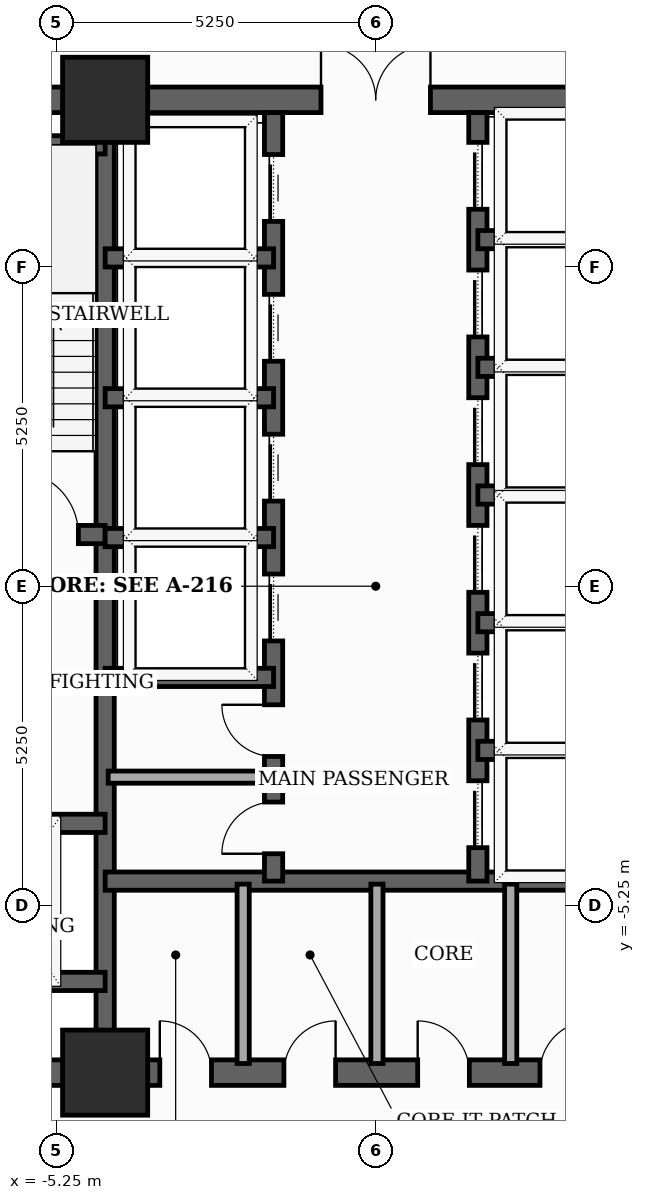
"""IFC4 building model, lengths in metres.
Left out: names, types, materials, properties, quantities, classifications, styles, units other than length and angle.
Written with IfcOpenShell. Run it as: python <this file> out.ifc"""

import sys

from ifc_helpers import new_model, si_unit, direction, frame, frame_2d, origin, origin_2d, place, context, subcontext, project, spatial, rectangle, extrude, element, fill, save


model = new_model("IFC4")
c1 = context("Model", 3, precision=1e-05, world=origin(), true_north=direction((0.0, 1.0)))
c2 = subcontext(c1, "Body", "Model", "MODEL_VIEW")
j1 = project(units=[si_unit("LENGTHUNIT", "METRE"), si_unit("PLANEANGLEUNIT", "RADIAN")], contexts=[c1])
p1 = place(None, origin())
s1 = spatial("IfcSite", under=j1, at=p1, CompositionType="ELEMENT")
p2 = place(p1, origin())
s2 = spatial("IfcBuilding", under=s1, at=p2, CompositionType="ELEMENT")
p3 = place(p2, frame((0.0, 0.0, 112.5)))
s3 = spatial("IfcBuildingStorey", under=s2, at=p3, CompositionType="ELEMENT", Elevation=112.5)
for number, where, z_axis, x_axis in (
    (1, (-4.45, -8.0, 0.0), (0.0, 0.0, 1.0), (1.0, 0.0, 0.0)),
    (2, (-4.45, 8.0, 0.0), (0.0, 0.0, 1.0), (1.0, 0.0, 0.0)),
):
    element("IfcColumn", number, at=place(p3, frame(where, z_axis=z_axis, x_axis=x_axis)), inside=s3, PredefinedType="COLUMN", context=c2, shape_type="SweptSolid", body=[
        extrude(rectangle(XDim=1.4, YDim=1.4, at=origin_2d()), origin(), (0.0, 0.0, 1.0), 3.7),
    ])
p4 = place(p3, frame((-8.0, -8.0, 0.0), z_axis=(0.0, 0.0, 1.0), x_axis=(1.0, 0.0, 0.0)))
e3 = element("IfcWall", 3, at=p4, inside=s3, PredefinedType="SHEAR", context=c2, shape_type="SweptSolid", body=[
    extrude(rectangle(XDim=16.0, YDim=0.42, at=frame_2d((8.0, 0.0))), origin(), (0.0, 0.0, 1.0), 3.5),
])
p5 = place(p4, frame((4.449, 0.0, 0.0)))
e4 = element("IfcOpeningElement", 4, at=p5, cuts=e3, PredefinedType="OPENING", context=c2, shape_type="SweptSolid", body=[
    extrude(rectangle(XDim=0.85, YDim=2.02, at=frame_2d((0.425, 1.01))), frame((0.0, 0.22, 0.0), z_axis=(0.0, -1.0, 0.0), x_axis=(1.0, 0.0, 0.0)), (0.0, 0.0, 1.0), 0.44),
])
p6 = place(p4, frame((6.49, 0.0, 0.0)))
e5 = element("IfcOpeningElement", 5, at=p6, cuts=e3, PredefinedType="OPENING", context=c2, shape_type="SweptSolid", body=[
    extrude(rectangle(XDim=0.85, YDim=2.02, at=frame_2d((0.425, 1.01))), frame((0.0, 0.22, 0.0), z_axis=(0.0, -1.0, 0.0), x_axis=(1.0, 0.0, 0.0)), (0.0, 0.0, 1.0), 0.44),
])
p7 = place(p4, frame((8.69, 0.0, 0.0)))
e6 = element("IfcOpeningElement", 6, at=p7, cuts=e3, PredefinedType="OPENING", context=c2, shape_type="SweptSolid", body=[
    extrude(rectangle(XDim=0.85, YDim=2.02, at=frame_2d((0.425, 1.01))), frame((0.0, 0.22, 0.0), z_axis=(0.0, -1.0, 0.0), x_axis=(1.0, 0.0, 0.0)), (0.0, 0.0, 1.0), 0.44),
])
p8 = place(p4, frame((10.701, 0.0, 0.0)))
e7 = element("IfcOpeningElement", 7, at=p8, cuts=e3, PredefinedType="OPENING", context=c2, shape_type="SweptSolid", body=[
    extrude(rectangle(XDim=0.85, YDim=2.02, at=frame_2d((0.425, 1.01))), frame((0.0, 0.22, 0.0), z_axis=(0.0, -1.0, 0.0), x_axis=(1.0, 0.0, 0.0)), (0.0, 0.0, 1.0), 0.44),
])
p9 = place(p3, frame((-8.0, 8.0, 0.0), z_axis=(0.0, 0.0, 1.0), x_axis=(1.0, 0.0, 0.0)))
e8 = element("IfcWall", 8, at=p9, inside=s3, PredefinedType="SHEAR", context=c2, shape_type="SweptSolid", body=[
    extrude(rectangle(XDim=16.0, YDim=0.42, at=frame_2d((8.0, 0.0))), origin(), (0.0, 0.0, 1.0), 3.5),
])
p10 = place(p9, frame((7.1, 0.0, 0.0)))
e9 = element("IfcOpeningElement", 9, at=p10, cuts=e8, PredefinedType="OPENING", context=c2, shape_type="SweptSolid", body=[
    extrude(rectangle(XDim=1.8, YDim=2.15, at=frame_2d((0.9, 1.075))), frame((0.0, 0.22, 0.0), z_axis=(0.0, -1.0, 0.0), x_axis=(1.0, 0.0, 0.0)), (0.0, 0.0, 1.0), 0.44),
])
p11 = place(p3, frame((-4.45, -7.79, 0.0), z_axis=(0.0, 0.0, 1.0), x_axis=(0.0, 1.0, 0.0)))
e10 = element("IfcWall", 10, at=p11, inside=s3, PredefinedType="SHEAR", context=c2, shape_type="SweptSolid", body=[
    extrude(rectangle(XDim=15.58, YDim=0.3, at=frame_2d((7.79, 0.0))), origin(), (0.0, 0.0, 1.0), 3.5),
])
p12 = place(p3, frame((-7.79, 0.85, 0.0), z_axis=(0.0, 0.0, 1.0), x_axis=(1.0, 0.0, 0.0)))
e11 = element("IfcWall", 11, at=p12, inside=s3, PredefinedType="SHEAR", context=c2, shape_type="SweptSolid", body=[
    extrude(rectangle(XDim=3.34, YDim=0.3, at=frame_2d((1.67, 0.0))), origin(), (0.0, 0.0, 1.0), 3.5),
])
p13 = place(p12, frame((1.85, 0.0, 0.0)))
e12 = element("IfcOpeningElement", 12, at=p13, cuts=e11, PredefinedType="OPENING", context=c2, shape_type="SweptSolid", body=[
    extrude(rectangle(XDim=1.05, YDim=2.15, at=frame_2d((0.525, 1.075))), frame((0.0, 0.16, 0.0), z_axis=(0.0, -1.0, 0.0), x_axis=(1.0, 0.0, 0.0)), (0.0, 0.0, 1.0), 0.32),
])
p14 = place(p3, frame((-7.79, 7.26, 0.0), z_axis=(0.0, 0.0, 1.0), x_axis=(1.0, 0.0, 0.0)))
e13 = element("IfcWall", 13, at=p14, inside=s3, PredefinedType="SHEAR", context=c2, shape_type="SweptSolid", body=[
    extrude(rectangle(XDim=3.34, YDim=0.3, at=frame_2d((1.67, 0.0))), origin(), (0.0, 0.0, 1.0), 3.5),
])
p15 = place(p3, frame((-7.79, -3.9, 0.0), z_axis=(0.0, 0.0, 1.0), x_axis=(1.0, 0.0, 0.0)))
e14 = element("IfcWall", 14, at=p15, inside=s3, PredefinedType="SHEAR", context=c2, shape_type="SweptSolid", body=[
    extrude(rectangle(XDim=3.34, YDim=0.3, at=frame_2d((1.67, 0.0))), origin(), (0.0, 0.0, 1.0), 3.5),
])
p16 = place(p15, frame((1.27, 0.0, 0.0)))
e15 = element("IfcOpeningElement", 15, at=p16, cuts=e14, PredefinedType="OPENING", context=c2, shape_type="SweptSolid", body=[
    extrude(rectangle(XDim=1.1, YDim=2.1, at=frame_2d((0.55, 1.05))), frame((0.0, 0.16, 0.0), z_axis=(0.0, -1.0, 0.0), x_axis=(1.0, 0.0, 0.0)), (0.0, 0.0, 1.0), 0.32),
])
p17 = place(p3, frame((-7.79, -6.5, 0.0), z_axis=(0.0, 0.0, 1.0), x_axis=(1.0, 0.0, 0.0)))
e16 = element("IfcWall", 16, at=p17, inside=s3, PredefinedType="SHEAR", context=c2, shape_type="SweptSolid", body=[
    extrude(rectangle(XDim=3.34, YDim=0.3, at=frame_2d((1.67, 0.0))), origin(), (0.0, 0.0, 1.0), 3.5),
])
p18 = place(p3, frame((-4.45, -4.85, 0.0), z_axis=(0.0, 0.0, 1.0), x_axis=(1.0, 0.0, 0.0)))
e17 = element("IfcWall", 17, at=p18, inside=s3, PredefinedType="SHEAR", context=c2, shape_type="SweptSolid", body=[
    extrude(rectangle(XDim=8.9, YDim=0.3, at=frame_2d((4.45, 0.0))), origin(), (0.0, 0.0, 1.0), 3.5),
])
p19 = place(p3, frame((-1.68, -4.85, 0.0), z_axis=(0.0, 0.0, 1.0), x_axis=(0.0, 1.0, 0.0)))
e18 = element("IfcWall", 18, at=p19, inside=s3, PredefinedType="SHEAR", context=c2, shape_type="SweptSolid", body=[
    extrude(rectangle(XDim=12.64, YDim=0.3, at=frame_2d((6.32, 0.0))), origin(), (0.0, 0.0, 1.0), 3.5),
])
p20 = place(p19, frame((3.95, 0.0, 0.0)))
e19 = element("IfcOpeningElement", 19, at=p20, cuts=e18, PredefinedType="OPENING", context=c2, shape_type="SweptSolid", body=[
    extrude(rectangle(XDim=1.1, YDim=2.1, at=frame_2d((0.55, 1.05))), frame((0.0, 0.16, 0.0), z_axis=(0.0, -1.0, 0.0), x_axis=(1.0, 0.0, 0.0)), (0.0, 0.0, 1.0), 0.32),
])
p21 = place(p19, frame((6.25, 0.0, 0.0)))
e20 = element("IfcOpeningElement", 20, at=p21, cuts=e18, PredefinedType="OPENING", context=c2, shape_type="SweptSolid", body=[
    extrude(rectangle(XDim=1.1, YDim=2.1, at=frame_2d((0.55, 1.05))), frame((0.0, 0.16, 0.0), z_axis=(0.0, -1.0, 0.0), x_axis=(1.0, 0.0, 0.0)), (0.0, 0.0, 1.0), 0.32),
])
p22 = place(p19, frame((8.55, 0.0, 0.0)))
e21 = element("IfcOpeningElement", 21, at=p22, cuts=e18, PredefinedType="OPENING", context=c2, shape_type="SweptSolid", body=[
    extrude(rectangle(XDim=1.1, YDim=2.1, at=frame_2d((0.55, 1.05))), frame((0.0, 0.16, 0.0), z_axis=(0.0, -1.0, 0.0), x_axis=(1.0, 0.0, 0.0)), (0.0, 0.0, 1.0), 0.32),
])
p23 = place(p19, frame((10.85, 0.0, 0.0)))
e22 = element("IfcOpeningElement", 22, at=p23, cuts=e18, PredefinedType="OPENING", context=c2, shape_type="SweptSolid", body=[
    extrude(rectangle(XDim=1.1, YDim=2.1, at=frame_2d((0.55, 1.05))), frame((0.0, 0.16, 0.0), z_axis=(0.0, -1.0, 0.0), x_axis=(1.0, 0.0, 0.0)), (0.0, 0.0, 1.0), 0.32),
])
p24 = place(p19, frame((0.45, 0.0, 0.0)))
e23 = element("IfcOpeningElement", 23, at=p24, cuts=e18, PredefinedType="OPENING", context=c2, shape_type="SweptSolid", body=[
    extrude(rectangle(XDim=0.85, YDim=2.02, at=frame_2d((0.425, 1.01))), frame((0.0, 0.16, 0.0), z_axis=(0.0, -1.0, 0.0), x_axis=(1.0, 0.0, 0.0)), (0.0, 0.0, 1.0), 0.32),
])
p25 = place(p19, frame((2.05, 0.0, 0.0)))
e24 = element("IfcOpeningElement", 24, at=p25, cuts=e18, PredefinedType="OPENING", context=c2, shape_type="SweptSolid", body=[
    extrude(rectangle(XDim=0.85, YDim=2.02, at=frame_2d((0.425, 1.01))), frame((0.0, 0.16, 0.0), z_axis=(0.0, -1.0, 0.0), x_axis=(1.0, 0.0, 0.0)), (0.0, 0.0, 1.0), 0.32),
])
p26 = place(p3, frame((1.68, -4.85, 0.0), z_axis=(0.0, 0.0, 1.0), x_axis=(0.0, 1.0, 0.0)))
e25 = element("IfcWall", 25, at=p26, inside=s3, PredefinedType="SHEAR", context=c2, shape_type="SweptSolid", body=[
    extrude(rectangle(XDim=12.64, YDim=0.3, at=frame_2d((6.32, 0.0))), origin(), (0.0, 0.0, 1.0), 3.5),
])
p27 = place(p26, frame((0.55, 0.0, 0.0)))
e26 = element("IfcOpeningElement", 26, at=p27, cuts=e25, PredefinedType="OPENING", context=c2, shape_type="SweptSolid", body=[
    extrude(rectangle(XDim=1.1, YDim=2.1, at=frame_2d((0.55, 1.05))), frame((0.0, 0.16, 0.0), z_axis=(0.0, -1.0, 0.0), x_axis=(1.0, 0.0, 0.0)), (0.0, 0.0, 1.0), 0.32),
])
p28 = place(p26, frame((2.65, 0.0, 0.0)))
e27 = element("IfcOpeningElement", 27, at=p28, cuts=e25, PredefinedType="OPENING", context=c2, shape_type="SweptSolid", body=[
    extrude(rectangle(XDim=1.1, YDim=2.1, at=frame_2d((0.55, 1.05))), frame((0.0, 0.16, 0.0), z_axis=(0.0, -1.0, 0.0), x_axis=(1.0, 0.0, 0.0)), (0.0, 0.0, 1.0), 0.32),
])
p29 = place(p26, frame((4.75, 0.0, 0.0)))
e28 = element("IfcOpeningElement", 28, at=p29, cuts=e25, PredefinedType="OPENING", context=c2, shape_type="SweptSolid", body=[
    extrude(rectangle(XDim=1.1, YDim=2.1, at=frame_2d((0.55, 1.05))), frame((0.0, 0.16, 0.0), z_axis=(0.0, -1.0, 0.0), x_axis=(1.0, 0.0, 0.0)), (0.0, 0.0, 1.0), 0.32),
])
p30 = place(p26, frame((6.85, 0.0, 0.0)))
e29 = element("IfcOpeningElement", 29, at=p30, cuts=e25, PredefinedType="OPENING", context=c2, shape_type="SweptSolid", body=[
    extrude(rectangle(XDim=1.1, YDim=2.1, at=frame_2d((0.55, 1.05))), frame((0.0, 0.16, 0.0), z_axis=(0.0, -1.0, 0.0), x_axis=(1.0, 0.0, 0.0)), (0.0, 0.0, 1.0), 0.32),
])
p31 = place(p26, frame((8.95, 0.0, 0.0)))
e30 = element("IfcOpeningElement", 30, at=p31, cuts=e25, PredefinedType="OPENING", context=c2, shape_type="SweptSolid", body=[
    extrude(rectangle(XDim=1.1, YDim=2.1, at=frame_2d((0.55, 1.05))), frame((0.0, 0.16, 0.0), z_axis=(0.0, -1.0, 0.0), x_axis=(1.0, 0.0, 0.0)), (0.0, 0.0, 1.0), 0.32),
])
p32 = place(p26, frame((11.05, 0.0, 0.0)))
e31 = element("IfcOpeningElement", 31, at=p32, cuts=e25, PredefinedType="OPENING", context=c2, shape_type="SweptSolid", body=[
    extrude(rectangle(XDim=1.1, YDim=2.1, at=frame_2d((0.55, 1.05))), frame((0.0, 0.16, 0.0), z_axis=(0.0, -1.0, 0.0), x_axis=(1.0, 0.0, 0.0)), (0.0, 0.0, 1.0), 0.32),
])
for number, where, z_axis, x_axis in (
    (32, (-4.45, -1.5, 0.0), (0.0, 0.0, 1.0), (1.0, 0.0, 0.0)),
    (33, (-4.45, 0.8, 0.0), (0.0, 0.0, 1.0), (1.0, 0.0, 0.0)),
    (34, (-4.45, 3.1, 0.0), (0.0, 0.0, 1.0), (1.0, 0.0, 0.0)),
    (35, (-4.45, 5.4, 0.0), (0.0, 0.0, 1.0), (1.0, 0.0, 0.0)),
    (36, (1.68, 1.5, 0.0), (0.0, 0.0, 1.0), (1.0, 0.0, 0.0)),
    (37, (1.68, 3.6, 0.0), (0.0, 0.0, 1.0), (1.0, 0.0, 0.0)),
    (38, (1.68, 5.7, 0.0), (0.0, 0.0, 1.0), (1.0, 0.0, 0.0)),
    (39, (1.68, -2.7, 0.0), (0.0, 0.0, 1.0), (1.0, 0.0, 0.0)),
    (40, (1.68, -0.6, 0.0), (0.0, 0.0, 1.0), (1.0, 0.0, 0.0)),
):
    element("IfcWall", number, at=place(p3, frame(where, z_axis=z_axis, x_axis=x_axis)), inside=s3, PredefinedType="SHEAR", context=c2, shape_type="SweptSolid", body=[
        extrude(rectangle(XDim=2.77, YDim=0.3, at=frame_2d((1.385, 0.0))), origin(), (0.0, 0.0, 1.0), 3.5),
    ])
for number, where, z_axis, x_axis in (
    (41, (-2.18, -7.85, 0.0), (0.0, 0.0, 1.0), (0.0, 1.0, 0.0)),
    (42, (0.02, -7.85, 0.0), (0.0, 0.0, 1.0), (0.0, 1.0, 0.0)),
    (43, (2.22, -7.85, 0.0), (0.0, 0.0, 1.0), (0.0, 1.0, 0.0)),
):
    element("IfcWall", number, at=place(p3, frame(where, z_axis=z_axis, x_axis=x_axis)), inside=s3, PredefinedType="SOLIDWALL", context=c2, shape_type="SweptSolid", body=[
        extrude(rectangle(XDim=2.95, YDim=0.2, at=frame_2d((1.475, 0.0))), origin(), (0.0, 0.0, 1.0), 2.885),
    ])
p33 = place(p3, frame((-4.4, -3.14, 0.0), z_axis=(0.0, 0.0, 1.0), x_axis=(1.0, 0.0, 0.0)))
e44 = element("IfcWall", 44, at=p33, inside=s3, PredefinedType="SOLIDWALL", context=c2, shape_type="SweptSolid", body=[
    extrude(rectangle(XDim=2.68, YDim=0.2, at=frame_2d((1.34, 0.0))), origin(), (0.0, 0.0, 1.0), 3.5),
])
p34 = place(p5, origin())
e45 = element("IfcDoor", 45, at=p34, inside=s3, OperationType="SINGLE_SWING_LEFT", PredefinedType="TRAPDOOR", context=c2, shape_type="SweptSolid", body=[
    extrude(rectangle(XDim=0.85, YDim=2.02, at=frame_2d((0.425, 1.01))), frame((0.0, 0.025, 0.0), z_axis=(0.0, -1.0, 0.0), x_axis=(1.0, 0.0, 0.0)), (0.0, 0.0, 1.0), 0.05),
])
fill(e4, e45)
p35 = place(p6, origin())
e46 = element("IfcDoor", 46, at=p35, inside=s3, OperationType="SINGLE_SWING_RIGHT", PredefinedType="TRAPDOOR", context=c2, shape_type="SweptSolid", body=[
    extrude(rectangle(XDim=0.85, YDim=2.02, at=frame_2d((0.425, 1.01))), frame((0.0, 0.025, 0.0), z_axis=(0.0, -1.0, 0.0), x_axis=(1.0, 0.0, 0.0)), (0.0, 0.0, 1.0), 0.05),
])
fill(e5, e46)
p36 = place(p7, origin())
e47 = element("IfcDoor", 47, at=p36, inside=s3, OperationType="SINGLE_SWING_LEFT", PredefinedType="TRAPDOOR", context=c2, shape_type="SweptSolid", body=[
    extrude(rectangle(XDim=0.85, YDim=2.02, at=frame_2d((0.425, 1.01))), frame((0.0, 0.025, 0.0), z_axis=(0.0, -1.0, 0.0), x_axis=(1.0, 0.0, 0.0)), (0.0, 0.0, 1.0), 0.05),
])
fill(e6, e47)
p37 = place(p8, origin())
e48 = element("IfcDoor", 48, at=p37, inside=s3, OperationType="SINGLE_SWING_RIGHT", PredefinedType="TRAPDOOR", context=c2, shape_type="SweptSolid", body=[
    extrude(rectangle(XDim=0.85, YDim=2.02, at=frame_2d((0.425, 1.01))), frame((0.0, 0.025, 0.0), z_axis=(0.0, -1.0, 0.0), x_axis=(1.0, 0.0, 0.0)), (0.0, 0.0, 1.0), 0.05),
])
fill(e7, e48)
p38 = place(p10, origin())
e49 = element("IfcDoor", 49, at=p38, inside=s3, OperationType="DOUBLE_DOOR_SINGLE_SWING", PredefinedType="DOOR", context=c2, shape_type="SweptSolid", body=[
    extrude(rectangle(XDim=1.8, YDim=2.15, at=frame_2d((0.9, 1.075))), frame((0.0, 0.025, 0.0), z_axis=(0.0, -1.0, 0.0), x_axis=(1.0, 0.0, 0.0)), (0.0, 0.0, 1.0), 0.05),
])
fill(e9, e49)
p39 = place(p13, origin())
e50 = element("IfcDoor", 50, at=p39, inside=s3, OperationType="SINGLE_SWING_LEFT", PredefinedType="DOOR", context=c2, shape_type="SweptSolid", body=[
    extrude(rectangle(XDim=1.05, YDim=2.15, at=frame_2d((0.525, 1.075))), frame((0.0, 0.025, 0.0), z_axis=(0.0, -1.0, 0.0), x_axis=(1.0, 0.0, 0.0)), (0.0, 0.0, 1.0), 0.05),
])
fill(e12, e50)
p40 = place(p20, origin())
e51 = element("IfcDoor", 51, at=p40, inside=s3, OperationType="SLIDING_TO_LEFT", PredefinedType="DOOR", context=c2, shape_type="SweptSolid", body=[
    extrude(rectangle(XDim=1.1, YDim=2.1, at=frame_2d((0.55, 1.05))), frame((0.0, 0.025, 0.0), z_axis=(0.0, -1.0, 0.0), x_axis=(1.0, 0.0, 0.0)), (0.0, 0.0, 1.0), 0.05),
])
fill(e19, e51)
p41 = place(p21, origin())
e52 = element("IfcDoor", 52, at=p41, inside=s3, OperationType="SLIDING_TO_LEFT", PredefinedType="DOOR", context=c2, shape_type="SweptSolid", body=[
    extrude(rectangle(XDim=1.1, YDim=2.1, at=frame_2d((0.55, 1.05))), frame((0.0, 0.025, 0.0), z_axis=(0.0, -1.0, 0.0), x_axis=(1.0, 0.0, 0.0)), (0.0, 0.0, 1.0), 0.05),
])
fill(e20, e52)
p42 = place(p22, origin())
e53 = element("IfcDoor", 53, at=p42, inside=s3, OperationType="SLIDING_TO_LEFT", PredefinedType="DOOR", context=c2, shape_type="SweptSolid", body=[
    extrude(rectangle(XDim=1.1, YDim=2.1, at=frame_2d((0.55, 1.05))), frame((0.0, 0.025, 0.0), z_axis=(0.0, -1.0, 0.0), x_axis=(1.0, 0.0, 0.0)), (0.0, 0.0, 1.0), 0.05),
])
fill(e21, e53)
p43 = place(p23, origin())
e54 = element("IfcDoor", 54, at=p43, inside=s3, OperationType="SLIDING_TO_LEFT", PredefinedType="DOOR", context=c2, shape_type="SweptSolid", body=[
    extrude(rectangle(XDim=1.1, YDim=2.1, at=frame_2d((0.55, 1.05))), frame((0.0, 0.025, 0.0), z_axis=(0.0, -1.0, 0.0), x_axis=(1.0, 0.0, 0.0)), (0.0, 0.0, 1.0), 0.05),
])
fill(e22, e54)
p44 = place(p24, origin())
e55 = element("IfcDoor", 55, at=p44, inside=s3, OperationType="SINGLE_SWING_LEFT", PredefinedType="TRAPDOOR", context=c2, shape_type="SweptSolid", body=[
    extrude(rectangle(XDim=0.85, YDim=2.02, at=frame_2d((0.425, 1.01))), frame((0.0, 0.025, 0.0), z_axis=(0.0, -1.0, 0.0), x_axis=(1.0, 0.0, 0.0)), (0.0, 0.0, 1.0), 0.05),
])
fill(e23, e55)
p45 = place(p25, origin())
e56 = element("IfcDoor", 56, at=p45, inside=s3, OperationType="SINGLE_SWING_RIGHT", PredefinedType="TRAPDOOR", context=c2, shape_type="SweptSolid", body=[
    extrude(rectangle(XDim=0.85, YDim=2.02, at=frame_2d((0.425, 1.01))), frame((0.0, 0.025, 0.0), z_axis=(0.0, -1.0, 0.0), x_axis=(1.0, 0.0, 0.0)), (0.0, 0.0, 1.0), 0.05),
])
fill(e24, e56)
p46 = place(p27, origin())
e57 = element("IfcDoor", 57, at=p46, inside=s3, OperationType="SLIDING_TO_LEFT", PredefinedType="DOOR", context=c2, shape_type="SweptSolid", body=[
    extrude(rectangle(XDim=1.1, YDim=2.1, at=frame_2d((0.55, 1.05))), frame((0.0, 0.025, 0.0), z_axis=(0.0, -1.0, 0.0), x_axis=(1.0, 0.0, 0.0)), (0.0, 0.0, 1.0), 0.05),
])
fill(e26, e57)
p47 = place(p28, origin())
e58 = element("IfcDoor", 58, at=p47, inside=s3, OperationType="SLIDING_TO_LEFT", PredefinedType="DOOR", context=c2, shape_type="SweptSolid", body=[
    extrude(rectangle(XDim=1.1, YDim=2.1, at=frame_2d((0.55, 1.05))), frame((0.0, 0.025, 0.0), z_axis=(0.0, -1.0, 0.0), x_axis=(1.0, 0.0, 0.0)), (0.0, 0.0, 1.0), 0.05),
])
fill(e27, e58)
p48 = place(p29, origin())
e59 = element("IfcDoor", 59, at=p48, inside=s3, OperationType="SLIDING_TO_LEFT", PredefinedType="DOOR", context=c2, shape_type="SweptSolid", body=[
    extrude(rectangle(XDim=1.1, YDim=2.1, at=frame_2d((0.55, 1.05))), frame((0.0, 0.025, 0.0), z_axis=(0.0, -1.0, 0.0), x_axis=(1.0, 0.0, 0.0)), (0.0, 0.0, 1.0), 0.05),
])
fill(e28, e59)
p49 = place(p30, origin())
e60 = element("IfcDoor", 60, at=p49, inside=s3, OperationType="SLIDING_TO_LEFT", PredefinedType="DOOR", context=c2, shape_type="SweptSolid", body=[
    extrude(rectangle(XDim=1.1, YDim=2.1, at=frame_2d((0.55, 1.05))), frame((0.0, 0.025, 0.0), z_axis=(0.0, -1.0, 0.0), x_axis=(1.0, 0.0, 0.0)), (0.0, 0.0, 1.0), 0.05),
])
fill(e29, e60)
p50 = place(p31, origin())
e61 = element("IfcDoor", 61, at=p50, inside=s3, OperationType="SLIDING_TO_LEFT", PredefinedType="DOOR", context=c2, shape_type="SweptSolid", body=[
    extrude(rectangle(XDim=1.1, YDim=2.1, at=frame_2d((0.55, 1.05))), frame((0.0, 0.025, 0.0), z_axis=(0.0, -1.0, 0.0), x_axis=(1.0, 0.0, 0.0)), (0.0, 0.0, 1.0), 0.05),
])
fill(e30, e61)
p51 = place(p32, origin())
e62 = element("IfcDoor", 62, at=p51, inside=s3, OperationType="SLIDING_TO_LEFT", PredefinedType="DOOR", context=c2, shape_type="SweptSolid", body=[
    extrude(rectangle(XDim=1.1, YDim=2.1, at=frame_2d((0.55, 1.05))), frame((0.0, 0.025, 0.0), z_axis=(0.0, -1.0, 0.0), x_axis=(1.0, 0.0, 0.0)), (0.0, 0.0, 1.0), 0.05),
])
fill(e31, e62)
save(model, sys.argv[1])
